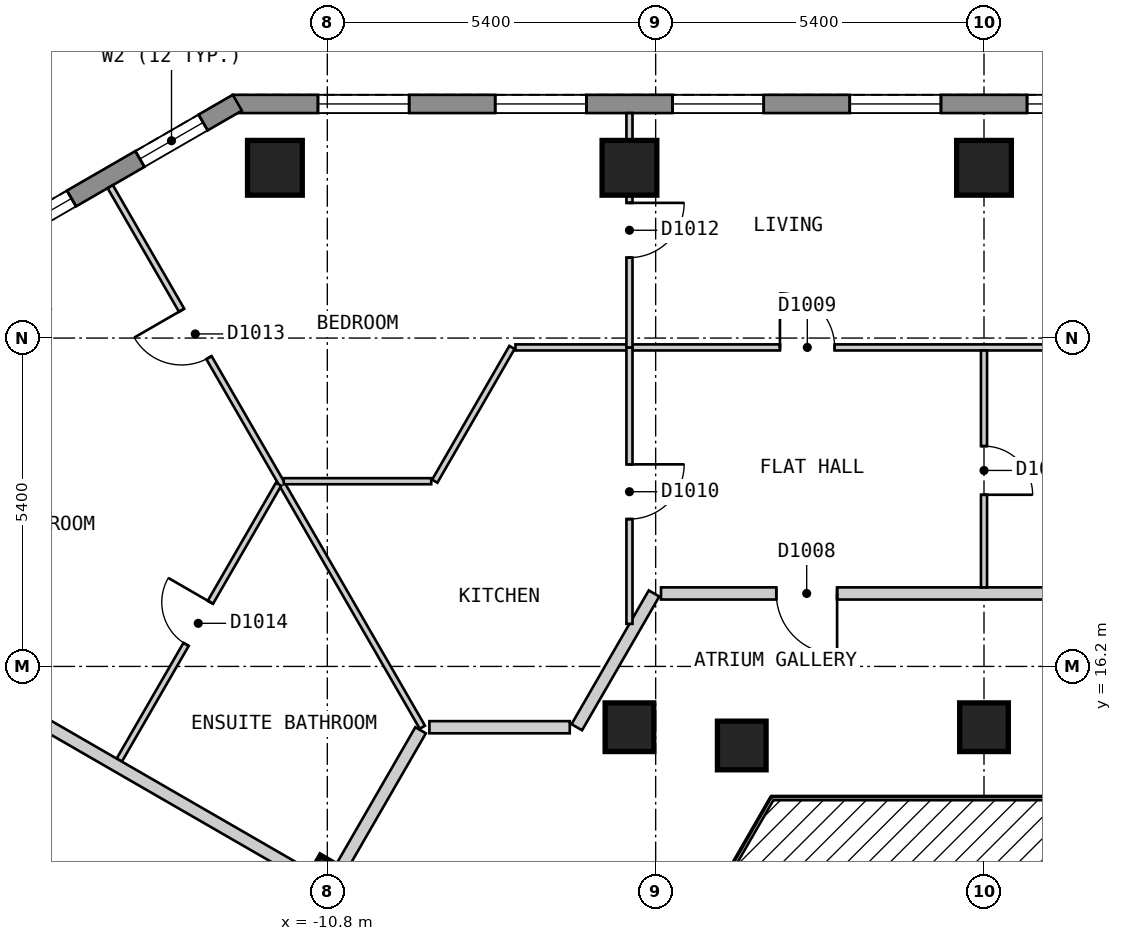
"""IFC4 building model, lengths in metres.
Left out: names, types, materials, properties, quantities, classifications, styles, units other than length and angle.
Written with IfcOpenShell. Run it as: python <this file> out.ifc"""

import sys

from ifc_helpers import new_model, si_unit, direction, frame, frame_2d, origin, origin_2d, place, context, subcontext, project, spatial, polyline, rectangle, outline, extrude, element, fill, save


model = new_model("IFC4")
c1 = context("Model", 3, precision=1e-05, world=origin(), true_north=direction((0.0, 1.0)))
c2 = subcontext(c1, "Body", "Model", "MODEL_VIEW")
j1 = project(units=[si_unit("LENGTHUNIT", "METRE"), si_unit("PLANEANGLEUNIT", "RADIAN")], contexts=[c1])
p1 = place(None, origin())
s1 = spatial("IfcSite", under=j1, at=p1, CompositionType="ELEMENT")
p2 = place(p1, origin())
s2 = spatial("IfcBuilding", under=s1, at=p2, CompositionType="ELEMENT")
p3 = place(p2, frame((0.0, 0.0, 120.6)))
s3 = spatial("IfcBuildingStorey", under=s2, at=p3, CompositionType="ELEMENT", Elevation=120.6)
for number, where, z_axis, x_axis in (
    (1, (0.0, 24.4, 0.0), (0.0, 0.0, 1.0), (-1.0, 0.0, 0.0)),
    (2, (-5.831, 24.4, 0.0), (0.0, 0.0, 1.0), (-1.0, 0.0, 0.0)),
    (3, (-11.662, 24.4, 0.0), (0.0, 0.0, 1.0), (-1.0, 0.0, 0.0)),
):
    element("IfcColumn", number, at=place(p3, frame(where, z_axis=z_axis, x_axis=x_axis)), inside=s3, PredefinedType="COLUMN", context=c2, shape_type="SweptSolid", body=[
        extrude(rectangle(XDim=0.9, YDim=0.9, at=origin_2d()), origin(), (0.0, 0.0, 1.0), 3.0),
    ])
for number, where, z_axis, x_axis in (
    (4, (0.0, 15.2, 0.0), (0.0, 0.0, 1.0), (-1.0, 0.0, 0.0)),
    (5, (-3.984, 14.9, 0.0), (0.0, 0.0, 1.0), (1.0, 0.0, 0.0)),
    (6, (-5.831, 15.2, 0.0), (0.0, 0.0, 1.0), (-1.0, 0.0, 0.0)),
    (7, (-10.768, 12.55, 0.0), (0.0, 0.0, 1.0), (-0.5, -0.866, 0.0)),
):
    element("IfcColumn", number, at=place(p3, frame(where, z_axis=z_axis, x_axis=x_axis)), inside=s3, PredefinedType="COLUMN", context=c2, shape_type="SweptSolid", body=[
        extrude(rectangle(XDim=0.8, YDim=0.8, at=origin_2d()), origin(), (0.0, 0.0, 1.0), 3.0),
    ])
p4 = place(p3, frame((12.355, 25.45, 0.0), z_axis=(0.0, 0.0, 1.0), x_axis=(-1.0, 0.0, 0.0)))
e8 = element("IfcWall", 8, at=p4, inside=s3, PredefinedType="SOLIDWALL", context=c2, shape_type="SweptSolid", body=[
    extrude(outline(polyline([(0.0, -0.15), (24.71, -0.15), (24.63, 0.15), (0.08, 0.15), (0.0, -0.15)])), origin(), (0.0, 0.0, 1.0), 2.7),
])
p5 = place(p4, frame((1.401, 0.0, 0.15)))
e9 = element("IfcOpeningElement", 9, at=p5, cuts=e8, PredefinedType="OPENING", context=c2, shape_type="SweptSolid", body=[
    extrude(rectangle(XDim=1.5, YDim=2.1, at=frame_2d((0.75, 1.05))), frame((0.0, 0.16, 0.0), z_axis=(0.0, -1.0, 0.0), x_axis=(1.0, 0.0, 0.0)), (0.0, 0.0, 1.0), 0.32),
])
p6 = place(p4, frame((4.316, 0.0, 0.15)))
e10 = element("IfcOpeningElement", 10, at=p6, cuts=e8, PredefinedType="OPENING", context=c2, shape_type="SweptSolid", body=[
    extrude(rectangle(XDim=1.5, YDim=2.1, at=frame_2d((0.75, 1.05))), frame((0.0, 0.16, 0.0), z_axis=(0.0, -1.0, 0.0), x_axis=(1.0, 0.0, 0.0)), (0.0, 0.0, 1.0), 0.32),
])
p7 = place(p4, frame((7.232, 0.0, 0.15)))
e11 = element("IfcOpeningElement", 11, at=p7, cuts=e8, PredefinedType="OPENING", context=c2, shape_type="SweptSolid", body=[
    extrude(rectangle(XDim=1.5, YDim=2.1, at=frame_2d((0.75, 1.05))), frame((0.0, 0.16, 0.0), z_axis=(0.0, -1.0, 0.0), x_axis=(1.0, 0.0, 0.0)), (0.0, 0.0, 1.0), 0.32),
])
p8 = place(p4, frame((10.147, 0.0, 0.15)))
e12 = element("IfcOpeningElement", 12, at=p8, cuts=e8, PredefinedType="OPENING", context=c2, shape_type="SweptSolid", body=[
    extrude(rectangle(XDim=1.5, YDim=2.1, at=frame_2d((0.75, 1.05))), frame((0.0, 0.16, 0.0), z_axis=(0.0, -1.0, 0.0), x_axis=(1.0, 0.0, 0.0)), (0.0, 0.0, 1.0), 0.32),
])
p9 = place(p4, frame((13.063, 0.0, 0.15)))
e13 = element("IfcOpeningElement", 13, at=p9, cuts=e8, PredefinedType="OPENING", context=c2, shape_type="SweptSolid", body=[
    extrude(rectangle(XDim=1.5, YDim=2.1, at=frame_2d((0.75, 1.05))), frame((0.0, 0.16, 0.0), z_axis=(0.0, -1.0, 0.0), x_axis=(1.0, 0.0, 0.0)), (0.0, 0.0, 1.0), 0.32),
])
p10 = place(p4, frame((15.978, 0.0, 0.15)))
e14 = element("IfcOpeningElement", 14, at=p10, cuts=e8, PredefinedType="OPENING", context=c2, shape_type="SweptSolid", body=[
    extrude(rectangle(XDim=1.5, YDim=2.1, at=frame_2d((0.75, 1.05))), frame((0.0, 0.16, 0.0), z_axis=(0.0, -1.0, 0.0), x_axis=(1.0, 0.0, 0.0)), (0.0, 0.0, 1.0), 0.32),
])
p11 = place(p4, frame((18.894, 0.0, 0.15)))
e15 = element("IfcOpeningElement", 15, at=p11, cuts=e8, PredefinedType="OPENING", context=c2, shape_type="SweptSolid", body=[
    extrude(rectangle(XDim=1.5, YDim=2.1, at=frame_2d((0.75, 1.05))), frame((0.0, 0.16, 0.0), z_axis=(0.0, -1.0, 0.0), x_axis=(1.0, 0.0, 0.0)), (0.0, 0.0, 1.0), 0.32),
])
p12 = place(p4, frame((21.809, 0.0, 0.15)))
e16 = element("IfcOpeningElement", 16, at=p12, cuts=e8, PredefinedType="OPENING", context=c2, shape_type="SweptSolid", body=[
    extrude(rectangle(XDim=1.5, YDim=2.1, at=frame_2d((0.75, 1.05))), frame((0.0, 0.16, 0.0), z_axis=(0.0, -1.0, 0.0), x_axis=(1.0, 0.0, 0.0)), (0.0, 0.0, 1.0), 0.32),
])
p13 = place(p3, frame((-12.28, 25.47, 0.0), z_axis=(0.0, 0.0, 1.0), x_axis=(-0.866022959057, -0.500004234368, 0.0)))
e17 = element("IfcWall", 17, at=p13, inside=s3, PredefinedType="SOLIDWALL", context=c2, shape_type="SweptSolid", body=[
    extrude(outline(polyline([(0.0, -0.15), (5.0, -0.15), (4.92, 0.15), (0.08, 0.15), (0.0, -0.15)])), origin(), (0.0, 0.0, 1.0), 2.7),
])
p14 = place(p13, frame((0.65, 0.0, 0.15)))
e18 = element("IfcOpeningElement", 18, at=p14, cuts=e17, PredefinedType="OPENING", context=c2, shape_type="SweptSolid", body=[
    extrude(rectangle(XDim=1.2, YDim=2.1, at=frame_2d((0.6, 1.05))), frame((0.0, 0.16, 0.0), z_axis=(0.0, -1.0, 0.0), x_axis=(1.0, 0.0, 0.0)), (0.0, 0.0, 1.0), 0.32),
])
p15 = place(p13, frame((3.149, 0.0, 0.15)))
e19 = element("IfcOpeningElement", 19, at=p15, cuts=e17, PredefinedType="OPENING", context=c2, shape_type="SweptSolid", body=[
    extrude(rectangle(XDim=1.2, YDim=2.1, at=frame_2d((0.6, 1.05))), frame((0.0, 0.16, 0.0), z_axis=(0.0, -1.0, 0.0), x_axis=(1.0, 0.0, 0.0)), (0.0, 0.0, 1.0), 0.32),
])
p16 = place(p3, frame((-9.121, 15.2, 0.0), z_axis=(0.0, 0.0, 1.0), x_axis=(1.0, 0.0, 0.0)))
e20 = element("IfcWall", 20, at=p16, inside=s3, PredefinedType="PARTITIONING", context=c2, shape_type="SweptSolid", body=[
    extrude(rectangle(XDim=2.308, YDim=0.2, at=frame_2d((1.154, 0.0))), origin(), (0.0, 0.0, 1.0), 2.7),
])
p17 = place(p3, frame((-5.312, 17.4, 0.0), z_axis=(0.0, 0.0, 1.0), x_axis=(1.0, 0.0, 0.0)))
e21 = element("IfcWall", 21, at=p17, inside=s3, PredefinedType="PARTITIONING", context=c2, shape_type="SweptSolid", body=[
    extrude(rectangle(XDim=10.739, YDim=0.2, at=frame_2d((5.37, 0.0))), origin(), (0.0, 0.0, 1.0), 2.7),
])
p18 = place(p17, frame((1.896, 0.0, 0.0)))
e22 = element("IfcOpeningElement", 22, at=p18, cuts=e21, PredefinedType="OPENING", context=c2, shape_type="SweptSolid", body=[
    extrude(rectangle(XDim=1.0, YDim=2.1, at=frame_2d((0.5, 1.05))), frame((0.0, 0.11, 0.0), z_axis=(0.0, -1.0, 0.0), x_axis=(1.0, 0.0, 0.0)), (0.0, 0.0, 1.0), 0.22),
])
p19 = place(p3, frame((-6.697, 15.2, 0.0), z_axis=(0.0, 0.0, 1.0), x_axis=(0.499963722229, 0.866046347752, 0.0)))
e23 = element("IfcWall", 23, at=p19, inside=s3, PredefinedType="PARTITIONING", context=c2, shape_type="SweptSolid", body=[
    extrude(rectangle(XDim=2.54, YDim=0.2, at=frame_2d((1.27, 0.0))), origin(), (0.0, 0.0, 1.0), 2.7),
])
p20 = place(p3, frame((-17.753, 0.45, 0.0), z_axis=(0.0, 0.0, 1.0), x_axis=(0.499990970252, 0.866030617049, 0.0)))
e24 = element("IfcWall", 24, at=p20, inside=s3, PredefinedType="PARTITIONING", context=c2, shape_type="SweptSolid", body=[
    extrude(rectangle(XDim=16.974, YDim=0.2, at=frame_2d((8.487, 0.0))), origin(), (0.0, 0.0, 1.0), 2.7),
])
p21 = place(p20, frame((10.73, 0.0, 0.0)))
e25 = element("IfcOpeningElement", 25, at=p21, cuts=e24, PredefinedType="OPENING", context=c2, shape_type="SweptSolid", body=[
    extrude(rectangle(XDim=1.0, YDim=2.1, at=frame_2d((0.5, 1.05))), frame((0.0, 0.11, 0.0), z_axis=(0.0, -1.0, 0.0), x_axis=(1.0, 0.0, 0.0)), (0.0, 0.0, 1.0), 0.22),
])
p22 = place(p20, frame((5.245, 0.0, 0.0)))
e26 = element("IfcOpeningElement", 26, at=p22, cuts=e24, PredefinedType="OPENING", context=c2, shape_type="SweptSolid", body=[
    extrude(rectangle(XDim=1.0, YDim=2.1, at=frame_2d((0.5, 1.05))), frame((0.0, 0.11, 0.0), z_axis=(0.0, -1.0, 0.0), x_axis=(1.0, 0.0, 0.0)), (0.0, 0.0, 1.0), 0.22),
])
p23 = place(p20, frame((0.594, 0.0, 0.0)))
e27 = element("IfcOpeningElement", 27, at=p23, cuts=e24, PredefinedType="OPENING", context=c2, shape_type="SweptSolid", body=[
    extrude(rectangle(XDim=1.0, YDim=2.1, at=frame_2d((0.5, 1.05))), frame((0.0, 0.11, 0.0), z_axis=(0.0, -1.0, 0.0), x_axis=(1.0, 0.0, 0.0)), (0.0, 0.0, 1.0), 0.22),
])
p24 = place(p3, frame((-14.37, 24.09, 0.0), z_axis=(0.0, 0.0, 1.0), x_axis=(0.50002438799, -0.866011322914, 0.0)))
e28 = element("IfcWall", 28, at=p24, inside=s3, PredefinedType="PARTITIONING", context=c2, shape_type="SweptSolid", body=[
    extrude(rectangle(XDim=10.266, YDim=0.1, at=frame_2d((5.133, 0.0))), origin(), (0.0, 0.0, 1.0), 2.7),
])
p25 = place(p24, frame((2.347, 0.0, 0.0)))
e29 = element("IfcOpeningElement", 29, at=p25, cuts=e28, PredefinedType="OPENING", context=c2, shape_type="SweptSolid", body=[
    extrude(rectangle(XDim=0.9, YDim=2.1, at=frame_2d((0.45, 1.05))), frame((0.0, 0.06, 0.0), z_axis=(0.0, -1.0, 0.0), x_axis=(1.0, 0.0, 0.0)), (0.0, 0.0, 1.0), 0.12),
])
p26 = place(p3, frame((-11.516, 19.246, 0.0), z_axis=(0.0, 0.0, 1.0), x_axis=(1.0, 0.0, 0.0)))
e30 = element("IfcWall", 30, at=p26, inside=s3, PredefinedType="PARTITIONING", context=c2, shape_type="SweptSolid", body=[
    extrude(rectangle(XDim=2.425, YDim=0.1, at=frame_2d((1.212, 0.0))), origin(), (0.0, 0.0, 1.0), 2.7),
])
p27 = place(p3, frame((-7.706, 21.446, 0.0), z_axis=(0.0, 0.0, 1.0), x_axis=(1.0, 0.0, 0.0)))
e31 = element("IfcWall", 31, at=p27, inside=s3, PredefinedType="PARTITIONING", context=c2, shape_type="SweptSolid", body=[
    extrude(rectangle(XDim=13.537, YDim=0.1, at=frame_2d((6.769, 0.0))), origin(), (0.0, 0.0, 1.0), 2.7),
])
p28 = place(p27, frame((4.35, 0.0, 0.0)))
e32 = element("IfcOpeningElement", 32, at=p28, cuts=e31, PredefinedType="OPENING", context=c2, shape_type="SweptSolid", body=[
    extrude(rectangle(XDim=0.9, YDim=2.1, at=frame_2d((0.45, 1.05))), frame((0.0, 0.06, 0.0), z_axis=(0.0, -1.0, 0.0), x_axis=(1.0, 0.0, 0.0)), (0.0, 0.0, 1.0), 0.12),
])
p29 = place(p3, frame((-9.033, 19.246, 0.0), z_axis=(0.0, 0.0, 1.0), x_axis=(0.499963722229, 0.866046347752, 0.0)))
e33 = element("IfcWall", 33, at=p29, inside=s3, PredefinedType="PARTITIONING", context=c2, shape_type="SweptSolid", body=[
    extrude(rectangle(XDim=2.54, YDim=0.1, at=frame_2d((1.27, 0.0))), origin(), (0.0, 0.0, 1.0), 2.7),
])
p30 = place(p3, frame((-14.222, 14.659, 0.0), z_axis=(0.0, 0.0, 1.0), x_axis=(0.500053212623, 0.865994679283, 0.0)))
e34 = element("IfcWall", 34, at=p30, inside=s3, PredefinedType="PARTITIONING", context=c2, shape_type="SweptSolid", body=[
    extrude(rectangle(XDim=5.239, YDim=0.1, at=frame_2d((2.62, 0.0))), origin(), (0.0, 0.0, 1.0), 2.7),
])
p31 = place(p30, frame((2.198, 0.0, 0.0)))
e35 = element("IfcOpeningElement", 35, at=p31, cuts=e34, PredefinedType="OPENING", context=c2, shape_type="SweptSolid", body=[
    extrude(rectangle(XDim=0.8, YDim=2.1, at=frame_2d((0.4, 1.05))), frame((0.0, 0.06, 0.0), z_axis=(0.0, -1.0, 0.0), x_axis=(1.0, 0.0, 0.0)), (0.0, 0.0, 1.0), 0.12),
])
p32 = place(p3, frame((0.0, 17.5, 0.0), z_axis=(0.0, 0.0, 1.0), x_axis=(0.0, 1.0, 0.0)))
e36 = element("IfcWall", 36, at=p32, inside=s3, PredefinedType="PARTITIONING", context=c2, shape_type="SweptSolid", body=[
    extrude(rectangle(XDim=3.896, YDim=0.1, at=frame_2d((1.948, 0.0))), origin(), (0.0, 0.0, 1.0), 2.7),
])
p33 = place(p32, frame((1.523, 0.0, 0.0)))
e37 = element("IfcOpeningElement", 37, at=p33, cuts=e36, PredefinedType="OPENING", context=c2, shape_type="SweptSolid", body=[
    extrude(rectangle(XDim=0.8, YDim=2.1, at=frame_2d((0.4, 1.05))), frame((0.0, 0.06, 0.0), z_axis=(0.0, -1.0, 0.0), x_axis=(1.0, 0.0, 0.0)), (0.0, 0.0, 1.0), 0.12),
])
p34 = place(p3, frame((-5.831, 16.9, 0.0), z_axis=(0.0, 0.0, 1.0), x_axis=(0.0, 1.0, 0.0)))
e38 = element("IfcWall", 38, at=p34, inside=s3, PredefinedType="PARTITIONING", context=c2, shape_type="SweptSolid", body=[
    extrude(rectangle(XDim=4.546, YDim=0.1, at=frame_2d((2.273, 0.0))), origin(), (0.0, 0.0, 1.0), 2.7),
])
p35 = place(p34, frame((1.723, 0.0, 0.0)))
e39 = element("IfcOpeningElement", 39, at=p35, cuts=e38, PredefinedType="OPENING", context=c2, shape_type="SweptSolid", body=[
    extrude(rectangle(XDim=0.9, YDim=2.1, at=frame_2d((0.45, 1.05))), frame((0.0, 0.06, 0.0), z_axis=(0.0, -1.0, 0.0), x_axis=(1.0, 0.0, 0.0)), (0.0, 0.0, 1.0), 0.12),
])
p36 = place(p3, frame((-19.514, 17.599, 0.0), z_axis=(0.0, 0.0, 1.0), x_axis=(0.866059142644, -0.499941558027, 0.0)))
e40 = element("IfcWall", 40, at=p36, inside=s3, PredefinedType="PARTITIONING", context=c2, shape_type="SweptSolid", body=[
    extrude(rectangle(XDim=9.999, YDim=0.2, at=frame_2d((5.0, 0.0))), origin(), (0.0, 0.0, 1.0), 2.7),
])
p37 = place(p3, frame((-5.831, 21.446, 0.0), z_axis=(0.0, 0.0, 1.0), x_axis=(0.0, 1.0, 0.0)))
e41 = element("IfcWall", 41, at=p37, inside=s3, PredefinedType="PARTITIONING", context=c2, shape_type="SweptSolid", body=[
    extrude(rectangle(XDim=3.854, YDim=0.1, at=frame_2d((1.927, 0.0))), origin(), (0.0, 0.0, 1.0), 2.7),
])
p38 = place(p37, frame((1.477, 0.0, 0.0)))
e42 = element("IfcOpeningElement", 42, at=p38, cuts=e41, PredefinedType="OPENING", context=c2, shape_type="SweptSolid", body=[
    extrude(rectangle(XDim=0.9, YDim=2.1, at=frame_2d((0.45, 1.05))), frame((0.0, 0.06, 0.0), z_axis=(0.0, -1.0, 0.0), x_axis=(1.0, 0.0, 0.0)), (0.0, 0.0, 1.0), 0.12),
])
p39 = place(p8, origin())
e43 = element("IfcWindow", 43, at=p39, inside=s3, PartitioningType="SINGLE_PANEL", PredefinedType="WINDOW", context=c2, shape_type="SweptSolid", body=[
    extrude(rectangle(XDim=1.5, YDim=2.1, at=frame_2d((0.75, 1.05))), frame((0.0, 0.03, 0.0), z_axis=(0.0, -1.0, 0.0), x_axis=(1.0, 0.0, 0.0)), (0.0, 0.0, 1.0), 0.06),
])
fill(e12, e43)
p40 = place(p9, origin())
e44 = element("IfcWindow", 44, at=p40, inside=s3, PartitioningType="SINGLE_PANEL", PredefinedType="WINDOW", context=c2, shape_type="SweptSolid", body=[
    extrude(rectangle(XDim=1.5, YDim=2.1, at=frame_2d((0.75, 1.05))), frame((0.0, 0.03, 0.0), z_axis=(0.0, -1.0, 0.0), x_axis=(1.0, 0.0, 0.0)), (0.0, 0.0, 1.0), 0.06),
])
fill(e13, e44)
p41 = place(p10, origin())
e45 = element("IfcWindow", 45, at=p41, inside=s3, PartitioningType="SINGLE_PANEL", PredefinedType="WINDOW", context=c2, shape_type="SweptSolid", body=[
    extrude(rectangle(XDim=1.5, YDim=2.1, at=frame_2d((0.75, 1.05))), frame((0.0, 0.03, 0.0), z_axis=(0.0, -1.0, 0.0), x_axis=(1.0, 0.0, 0.0)), (0.0, 0.0, 1.0), 0.06),
])
fill(e14, e45)
p42 = place(p11, origin())
e46 = element("IfcWindow", 46, at=p42, inside=s3, PartitioningType="SINGLE_PANEL", PredefinedType="WINDOW", context=c2, shape_type="SweptSolid", body=[
    extrude(rectangle(XDim=1.5, YDim=2.1, at=frame_2d((0.75, 1.05))), frame((0.0, 0.03, 0.0), z_axis=(0.0, -1.0, 0.0), x_axis=(1.0, 0.0, 0.0)), (0.0, 0.0, 1.0), 0.06),
])
fill(e15, e46)
p43 = place(p12, origin())
e47 = element("IfcWindow", 47, at=p43, inside=s3, PartitioningType="SINGLE_PANEL", PredefinedType="WINDOW", context=c2, shape_type="SweptSolid", body=[
    extrude(rectangle(XDim=1.5, YDim=2.1, at=frame_2d((0.75, 1.05))), frame((0.0, 0.03, 0.0), z_axis=(0.0, -1.0, 0.0), x_axis=(1.0, 0.0, 0.0)), (0.0, 0.0, 1.0), 0.06),
])
fill(e16, e47)
p44 = place(p14, origin())
e48 = element("IfcWindow", 48, at=p44, inside=s3, PartitioningType="SINGLE_PANEL", PredefinedType="WINDOW", context=c2, shape_type="SweptSolid", body=[
    extrude(rectangle(XDim=1.2, YDim=2.1, at=frame_2d((0.6, 1.05))), frame((0.0, 0.03, 0.0), z_axis=(0.0, -1.0, 0.0), x_axis=(1.0, 0.0, 0.0)), (0.0, 0.0, 1.0), 0.06),
])
fill(e18, e48)
p45 = place(p15, origin())
e49 = element("IfcWindow", 49, at=p45, inside=s3, PartitioningType="SINGLE_PANEL", PredefinedType="WINDOW", context=c2, shape_type="SweptSolid", body=[
    extrude(rectangle(XDim=1.2, YDim=2.1, at=frame_2d((0.6, 1.05))), frame((0.0, 0.03, 0.0), z_axis=(0.0, -1.0, 0.0), x_axis=(1.0, 0.0, 0.0)), (0.0, 0.0, 1.0), 0.06),
])
fill(e19, e49)
p46 = place(p18, origin())
e50 = element("IfcDoor", 50, at=p46, inside=s3, OperationType="SINGLE_SWING_RIGHT", PredefinedType="DOOR", context=c2, shape_type="SweptSolid", body=[
    extrude(rectangle(XDim=1.0, YDim=2.1, at=frame_2d((0.5, 1.05))), frame((0.0, 0.025, 0.0), z_axis=(0.0, -1.0, 0.0), x_axis=(1.0, 0.0, 0.0)), (0.0, 0.0, 1.0), 0.05),
])
fill(e22, e50)
p47 = place(p28, origin())
e51 = element("IfcDoor", 51, at=p47, inside=s3, OperationType="SINGLE_SWING_LEFT", PredefinedType="DOOR", context=c2, shape_type="SweptSolid", body=[
    extrude(rectangle(XDim=0.9, YDim=2.1, at=frame_2d((0.45, 1.05))), frame((0.0, 0.025, 0.0), z_axis=(0.0, -1.0, 0.0), x_axis=(1.0, 0.0, 0.0)), (0.0, 0.0, 1.0), 0.05),
])
fill(e32, e51)
p48 = place(p35, origin())
e52 = element("IfcDoor", 52, at=p48, inside=s3, OperationType="SINGLE_SWING_RIGHT", PredefinedType="DOOR", context=c2, shape_type="SweptSolid", body=[
    extrude(rectangle(XDim=0.9, YDim=2.1, at=frame_2d((0.45, 1.05))), frame((0.0, 0.025, 0.0), z_axis=(0.0, -1.0, 0.0), x_axis=(1.0, 0.0, 0.0)), (0.0, 0.0, 1.0), 0.05),
])
fill(e39, e52)
p49 = place(p33, origin())
e53 = element("IfcDoor", 53, at=p49, inside=s3, OperationType="SINGLE_SWING_LEFT", PredefinedType="DOOR", context=c2, shape_type="SweptSolid", body=[
    extrude(rectangle(XDim=0.8, YDim=2.1, at=frame_2d((0.4, 1.05))), frame((0.0, 0.025, 0.0), z_axis=(0.0, -1.0, 0.0), x_axis=(1.0, 0.0, 0.0)), (0.0, 0.0, 1.0), 0.05),
])
fill(e37, e53)
p50 = place(p38, origin())
e54 = element("IfcDoor", 54, at=p50, inside=s3, OperationType="SINGLE_SWING_RIGHT", PredefinedType="DOOR", context=c2, shape_type="SweptSolid", body=[
    extrude(rectangle(XDim=0.9, YDim=2.1, at=frame_2d((0.45, 1.05))), frame((0.0, 0.025, 0.0), z_axis=(0.0, -1.0, 0.0), x_axis=(1.0, 0.0, 0.0)), (0.0, 0.0, 1.0), 0.05),
])
fill(e42, e54)
p51 = place(p25, origin())
e55 = element("IfcDoor", 55, at=p51, inside=s3, OperationType="SINGLE_SWING_LEFT", PredefinedType="DOOR", context=c2, shape_type="SweptSolid", body=[
    extrude(rectangle(XDim=0.9, YDim=2.1, at=frame_2d((0.45, 1.05))), frame((0.0, 0.025, 0.0), z_axis=(0.0, -1.0, 0.0), x_axis=(1.0, 0.0, 0.0)), (0.0, 0.0, 1.0), 0.05),
])
fill(e29, e55)
p52 = place(p31, origin())
e56 = element("IfcDoor", 56, at=p52, inside=s3, OperationType="SINGLE_SWING_RIGHT", PredefinedType="DOOR", context=c2, shape_type="SweptSolid", body=[
    extrude(rectangle(XDim=0.8, YDim=2.1, at=frame_2d((0.4, 1.05))), frame((0.0, 0.025, 0.0), z_axis=(0.0, -1.0, 0.0), x_axis=(1.0, 0.0, 0.0)), (0.0, 0.0, 1.0), 0.05),
])
fill(e35, e56)
save(model, sys.argv[1])
